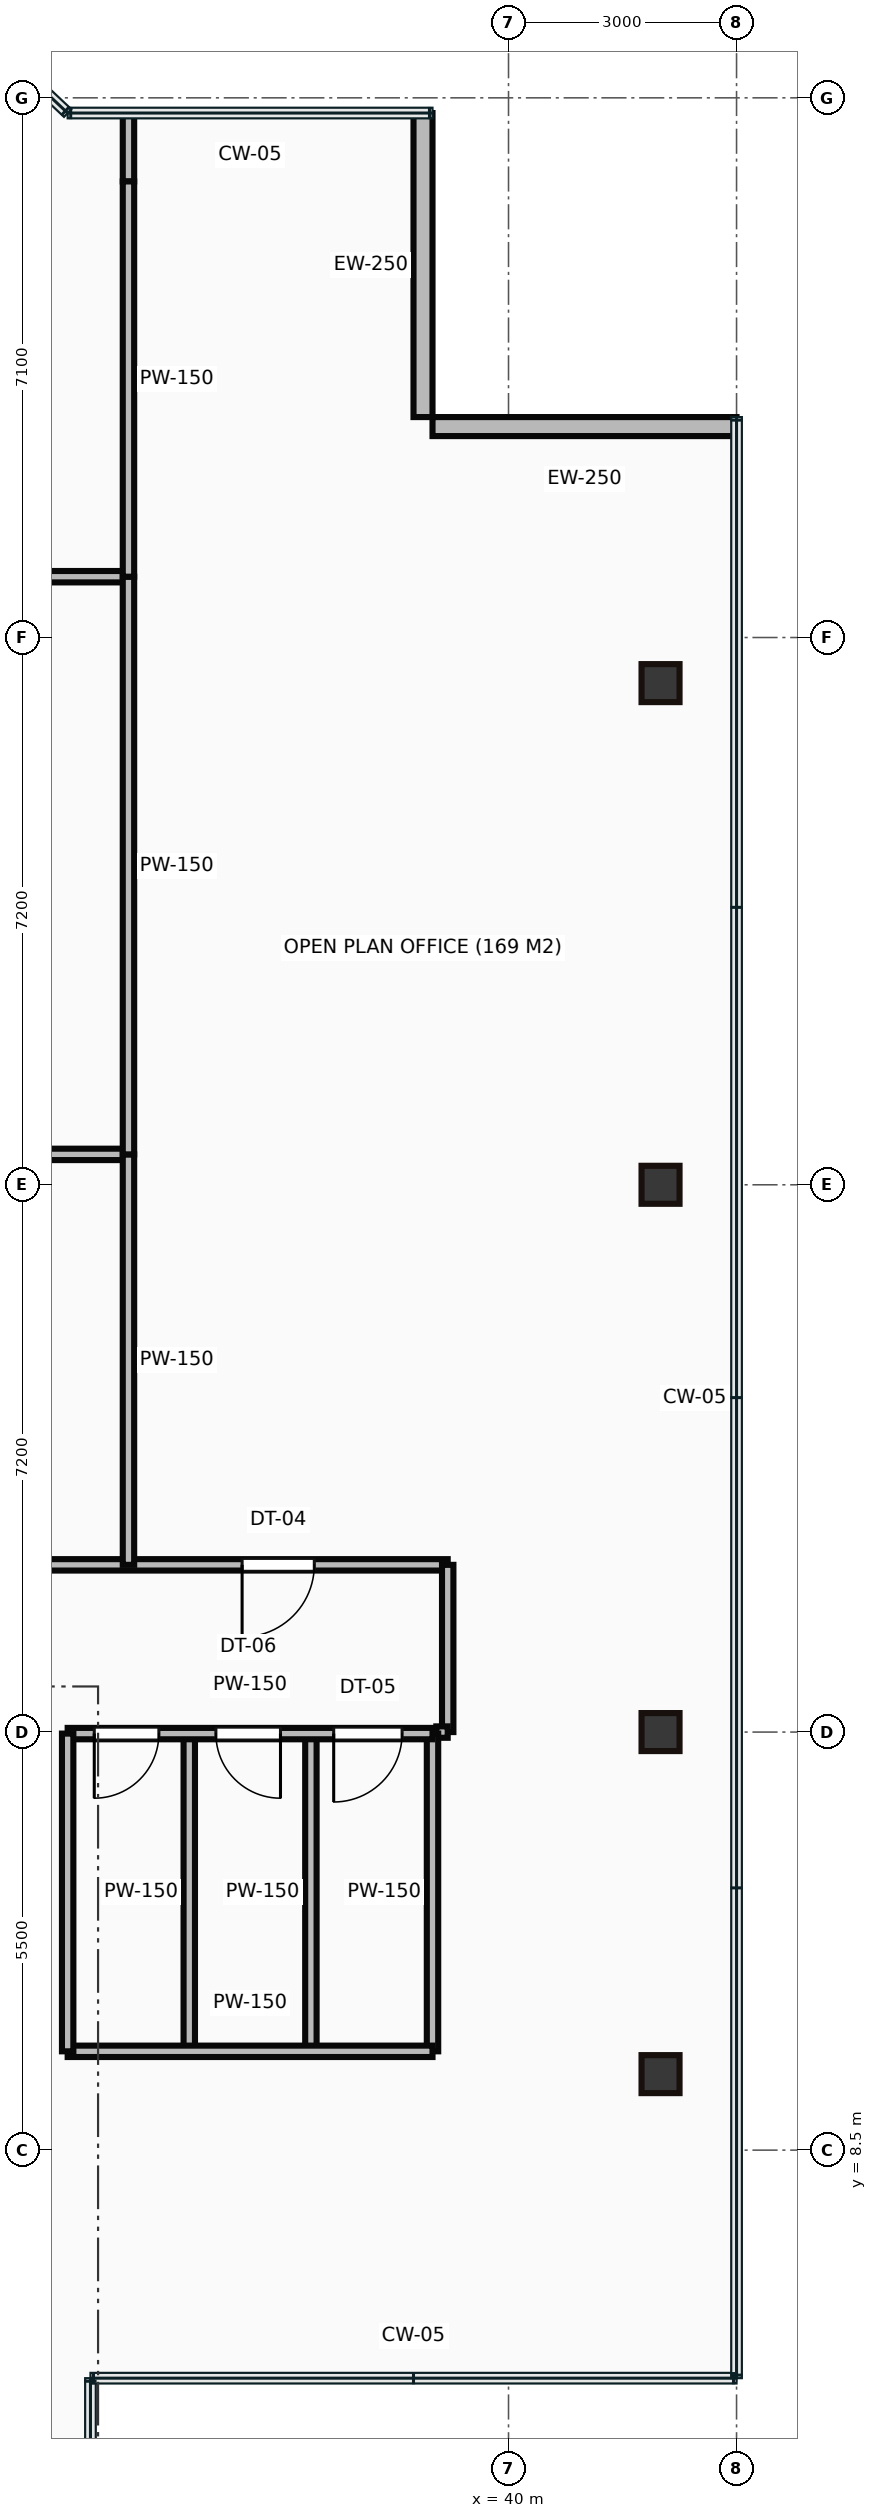
"""IFC4 building model, lengths in metres.
Left out: names, types, materials, properties, quantities, classifications, styles, units other than length and angle.
Written with IfcOpenShell. Run it as: python <this file> out.ifc"""

import sys

from ifc_helpers import new_model, si_unit, direction, frame, frame_2d, origin, origin_2d, place, context, subcontext, project, spatial, rectangle, hollow_rectangle, extrude, source, transform, mapped, element, fill, save


model = new_model("IFC4")
c1 = context("Model", 3, precision=1e-05, world=origin(), true_north=direction((0.0, 1.0)))
c2 = subcontext(c1, "Body", "Model", "MODEL_VIEW")
j1 = project(units=[si_unit("LENGTHUNIT", "METRE"), si_unit("PLANEANGLEUNIT", "RADIAN")], contexts=[c1])
p1 = place(None, origin())
s1 = spatial("IfcSite", under=j1, at=p1, CompositionType="ELEMENT")
p2 = place(p1, origin())
s2 = spatial("IfcBuilding", under=s1, at=p2, CompositionType="ELEMENT")
p3 = place(p2, frame((0.0, 0.0, 255.15)))
s3 = spatial("IfcBuildingStorey", under=s2, at=p3, CompositionType="ELEMENT", Elevation=255.15)
m1 = source(origin(), c2, "Body", "SweptSolid", [
    extrude(hollow_rectangle(XDim=0.5, YDim=0.5, WallThickness=0.022, at=origin_2d()), origin(), (0.0, 0.0, 1.0), 3.65),
])
for number, where, z_axis, x_axis in (
    (1, (42.0, 9.5, 0.0), (0.0, 0.0, 1.0), (1.0, 0.0, 0.0)),
    (2, (42.0, 14.0, 0.0), (0.0, 0.0, 1.0), (1.0, 0.0, 0.0)),
    (3, (42.0, 21.2, 0.0), (0.0, 0.0, 1.0), (1.0, 0.0, 0.0)),
    (4, (42.0, 27.8, 0.0), (0.0, 0.0, 1.0), (1.0, 0.0, 0.0)),
):
    element("IfcColumn", number, at=place(p3, frame(where, z_axis=z_axis, x_axis=x_axis)), inside=s3, PredefinedType="COLUMN", context=c2, shape_type="MappedRepresentation", body=[
        mapped(m1, transform((0.0, 0.0, 0.0))),
    ])
m2 = source(origin(), c2, "Body", "SweptSolid", [
    extrude(rectangle(XDim=4.0, YDim=0.25, at=frame_2d((2.0, 0.0))), origin(), (0.0, 0.0, 1.0), 3.4),
])
for number, where, z_axis, x_axis in (
    (5, (43.0, 31.175, 0.0), (0.0, 0.0, 1.0), (-1.0, 0.0, 0.0)),
    (6, (38.875, 31.3, 0.0), (0.0, 0.0, 1.0), (0.0, 1.0, 0.0)),
):
    element("IfcWall", number, at=place(p3, frame(where, z_axis=z_axis, x_axis=x_axis)), inside=s3, PredefinedType="STANDARD", context=c2, shape_type="MappedRepresentation", body=[
        mapped(m2, transform((0.0, 0.0, 0.0))),
    ])
m3 = source(origin(), c2, "Body", "SweptSolid", [
    extrude(rectangle(XDim=4.8, YDim=0.15, at=frame_2d((2.4, 0.0))), origin(), (0.0, 0.0, 1.0), 2.787),
])
p4 = place(p3, frame((34.2, 13.98, 0.0), z_axis=(0.0, 0.0, 1.0), x_axis=(1.0, 0.0, 0.0)))
e7 = element("IfcWall", 7, at=p4, inside=s3, PredefinedType="PARTITIONING", context=c2, shape_type="MappedRepresentation", body=[
    mapped(m3, transform((0.0, 0.0, 0.0))),
])
p5 = place(p4, frame((0.35, 0.0, 0.0)))
e8 = element("IfcOpeningElement", 8, at=p5, cuts=e7, PredefinedType="OPENING", context=c2, shape_type="SweptSolid", body=[
    extrude(rectangle(XDim=0.85, YDim=2.1, at=frame_2d((0.425, 1.05))), frame((0.0, 0.085, 0.0), z_axis=(0.0, -1.0, 0.0), x_axis=(1.0, 0.0, 0.0)), (0.0, 0.0, 1.0), 0.17),
])
p6 = place(p4, frame((1.95, 0.0, 0.0)))
e9 = element("IfcOpeningElement", 9, at=p6, cuts=e7, PredefinedType="OPENING", context=c2, shape_type="SweptSolid", body=[
    extrude(rectangle(XDim=0.85, YDim=2.1, at=frame_2d((0.425, 1.05))), frame((0.0, 0.085, 0.0), z_axis=(0.0, -1.0, 0.0), x_axis=(1.0, 0.0, 0.0)), (0.0, 0.0, 1.0), 0.17),
])
p7 = place(p4, frame((3.5, 0.0, 0.0)))
e10 = element("IfcOpeningElement", 10, at=p7, cuts=e7, PredefinedType="OPENING", context=c2, shape_type="SweptSolid", body=[
    extrude(rectangle(XDim=0.9, YDim=2.1, at=frame_2d((0.45, 1.05))), frame((0.0, 0.085, 0.0), z_axis=(0.0, -1.0, 0.0), x_axis=(1.0, 0.0, 0.0)), (0.0, 0.0, 1.0), 0.17),
])
m4 = source(origin(), c2, "Body", "SweptSolid", [
    extrude(rectangle(XDim=4.8, YDim=0.15, at=frame_2d((2.4, 0.0))), origin(), (0.0, 0.0, 1.0), 3.4),
])
p8 = place(p3, frame((34.2, 9.8, 0.0), z_axis=(0.0, 0.0, 1.0), x_axis=(1.0, 0.0, 0.0)))
e11 = element("IfcWall", 11, at=p8, inside=s3, PredefinedType="PARTITIONING", context=c2, shape_type="MappedRepresentation", body=[
    mapped(m4, transform((0.0, 0.0, 0.0))),
])
m5 = source(origin(), c2, "Body", "SweptSolid", [
    extrude(rectangle(XDim=4.18, YDim=0.15, at=frame_2d((2.09, 0.0))), origin(), (0.0, 0.0, 1.0), 3.4),
])
for number, where, z_axis, x_axis in (
    (12, (39.0, 9.8, 0.0), (0.0, 0.0, 1.0), (0.0, 1.0, 0.0)),
    (13, (34.2, 9.8, 0.0), (0.0, 0.0, 1.0), (0.0, 1.0, 0.0)),
    (14, (35.8, 9.8, 0.0), (0.0, 0.0, 1.0), (0.0, 1.0, 0.0)),
    (15, (37.4, 9.8, 0.0), (0.0, 0.0, 1.0), (0.0, 1.0, 0.0)),
):
    element("IfcWall", number, at=place(p3, frame(where, z_axis=z_axis, x_axis=x_axis)), inside=s3, PredefinedType="PARTITIONING", context=c2, shape_type="MappedRepresentation", body=[
        mapped(m5, transform((0.0, 0.0, 0.0))),
    ])
m6 = source(origin(), c2, "Body", "SweptSolid", [
    extrude(rectangle(XDim=13.45, YDim=0.15, at=frame_2d((6.725, 0.0))), origin(), (0.0, 0.0, 1.0), 3.4),
])
p9 = place(p3, frame((25.75, 16.2, 0.0), z_axis=(0.0, 0.0, 1.0), x_axis=(1.0, 0.0, 0.0)))
e16 = element("IfcWall", 16, at=p9, inside=s3, PredefinedType="PARTITIONING", context=c2, shape_type="MappedRepresentation", body=[
    mapped(m6, transform((0.0, 0.0, 0.0))),
])
p10 = place(p9, frame((4.28, 0.0, 0.0)))
e17 = element("IfcOpeningElement", 17, at=p10, cuts=e16, PredefinedType="OPENING", context=c2, shape_type="SweptSolid", body=[
    extrude(rectangle(XDim=0.95, YDim=2.15, at=frame_2d((0.475, 1.075))), frame((0.0, 0.085, 0.0), z_axis=(0.0, -1.0, 0.0), x_axis=(1.0, 0.0, 0.0)), (0.0, 0.0, 1.0), 0.17),
])
p11 = place(p9, frame((10.745, 0.0, 0.0)))
e18 = element("IfcOpeningElement", 18, at=p11, cuts=e16, PredefinedType="OPENING", context=c2, shape_type="SweptSolid", body=[
    extrude(rectangle(XDim=0.95, YDim=2.15, at=frame_2d((0.475, 1.075))), frame((0.0, 0.085, 0.0), z_axis=(0.0, -1.0, 0.0), x_axis=(1.0, 0.0, 0.0)), (0.0, 0.0, 1.0), 0.17),
])
m7 = source(origin(), c2, "Body", "SweptSolid", [
    extrude(rectangle(XDim=2.2, YDim=0.15, at=frame_2d((1.1, 0.0))), origin(), (0.0, 0.0, 1.0), 3.4),
])
p12 = place(p3, frame((39.2, 16.2, 0.0), z_axis=(0.0, 0.0, 1.0), x_axis=(0.0, -1.0, 0.0)))
e19 = element("IfcWall", 19, at=p12, inside=s3, PredefinedType="PARTITIONING", context=c2, shape_type="MappedRepresentation", body=[
    mapped(m7, transform((0.0, 0.0, 0.0))),
])
m8 = source(origin(), c2, "Body", "SweptSolid", [
    extrude(rectangle(XDim=0.15, YDim=0.15, at=frame_2d((0.075, 0.0))), origin(), (0.0, 0.0, 1.0), 3.4),
])
p13 = place(p3, frame((39.2, 14.0, 0.0), z_axis=(0.0, 0.0, 1.0), x_axis=(-1.0, 0.0, 0.0)))
e20 = element("IfcWall", 20, at=p13, inside=s3, PredefinedType="PARTITIONING", context=c2, shape_type="MappedRepresentation", body=[
    mapped(m8, transform((0.0, 0.0, 0.0))),
])
m9 = source(origin(), c2, "Body", "SweptSolid", [
    extrude(rectangle(XDim=9.25, YDim=0.15, at=frame_2d((4.625, 0.0))), origin(), (0.0, 0.0, 1.0), 3.4),
])
for number, where, z_axis, x_axis in (
    (21, (25.75, 21.6, 0.0), (0.0, 0.0, 1.0), (1.0, 0.0, 0.0)),
    (22, (35.0, 29.2, 0.0), (0.0, 0.0, 1.0), (-1.0, 0.0, 0.0)),
):
    element("IfcWall", number, at=place(p3, frame(where, z_axis=z_axis, x_axis=x_axis)), inside=s3, PredefinedType="PARTITIONING", context=c2, shape_type="MappedRepresentation", body=[
        mapped(m9, transform((0.0, 0.0, 0.0))),
    ])
m10 = source(origin(), c2, "Body", "SweptSolid", [
    extrude(rectangle(XDim=5.4, YDim=0.15, at=frame_2d((2.7, 0.0))), origin(), (0.0, 0.0, 1.0), 3.4),
])
p14 = place(p3, frame((35.0, 21.6, 0.0), z_axis=(0.0, 0.0, 1.0), x_axis=(0.0, -1.0, 0.0)))
e23 = element("IfcWall", 23, at=p14, inside=s3, PredefinedType="PARTITIONING", context=c2, shape_type="MappedRepresentation", body=[
    mapped(m10, transform((0.0, 0.0, 0.0))),
])
m11 = source(origin(), c2, "Body", "SweptSolid", [
    extrude(rectangle(XDim=7.6, YDim=0.15, at=frame_2d((3.8, 0.0))), origin(), (0.0, 0.0, 1.0), 3.4),
])
p15 = place(p3, frame((35.0, 29.2, 0.0), z_axis=(0.0, 0.0, 1.0), x_axis=(0.0, -1.0, 0.0)))
e24 = element("IfcWall", 24, at=p15, inside=s3, PredefinedType="PARTITIONING", context=c2, shape_type="MappedRepresentation", body=[
    mapped(m11, transform((0.0, 0.0, 0.0))),
])
m12 = source(origin(), c2, "Body", "SweptSolid", [
    extrude(rectangle(XDim=0.88, YDim=0.15, at=frame_2d((0.44, 0.0))), origin(), (0.0, 0.0, 1.0), 3.4),
])
p16 = place(p3, frame((35.0, 35.28, 0.0), z_axis=(0.0, 0.0, 1.0), x_axis=(0.0, -1.0, 0.0)))
e25 = element("IfcWall", 25, at=p16, inside=s3, PredefinedType="PARTITIONING", context=c2, shape_type="MappedRepresentation", body=[
    mapped(m12, transform((0.0, 0.0, 0.0))),
])
m13 = source(origin(), c2, "Body", "SweptSolid", [
    extrude(rectangle(XDim=5.2, YDim=0.15, at=frame_2d((2.6, 0.0))), origin(), (0.0, 0.0, 1.0), 3.4),
])
p17 = place(p3, frame((35.0, 34.4, 0.0), z_axis=(0.0, 0.0, 1.0), x_axis=(0.0, -1.0, 0.0)))
e26 = element("IfcWall", 26, at=p17, inside=s3, PredefinedType="PARTITIONING", context=c2, shape_type="MappedRepresentation", body=[
    mapped(m13, transform((0.0, 0.0, 0.0))),
])
m14 = source(origin(), c2, "Body", "SweptSolid", [
    extrude(rectangle(XDim=0.85, YDim=2.1, at=frame_2d((0.425, 1.05))), frame((0.0, 0.025, 0.0), z_axis=(0.0, -1.0, 0.0), x_axis=(1.0, 0.0, 0.0)), (0.0, 0.0, 1.0), 0.05),
])
p18 = place(p5, frame((0.85, 0.0, 0.0), z_axis=(0.0, 0.0, 1.0), x_axis=(-1.0, 0.0, 0.0)))
e27 = element("IfcDoor", 27, at=p18, inside=s3, OperationType="SINGLE_SWING_LEFT", PredefinedType="DOOR", context=c2, shape_type="MappedRepresentation", body=[
    mapped(m14, transform((0.0, 0.0, 0.0))),
])
fill(e8, e27)
p19 = place(p6, frame((0.85, 0.0, 0.0), z_axis=(0.0, 0.0, 1.0), x_axis=(-1.0, 0.0, 0.0)))
e28 = element("IfcDoor", 28, at=p19, inside=s3, OperationType="SINGLE_SWING_RIGHT", PredefinedType="DOOR", context=c2, shape_type="MappedRepresentation", body=[
    mapped(m14, transform((0.0, 0.0, 0.0))),
])
fill(e9, e28)
m15 = source(origin(), c2, "Body", "SweptSolid", [
    extrude(rectangle(XDim=0.9, YDim=2.1, at=frame_2d((0.45, 1.05))), frame((0.0, 0.025, 0.0), z_axis=(0.0, -1.0, 0.0), x_axis=(1.0, 0.0, 0.0)), (0.0, 0.0, 1.0), 0.05),
])
p20 = place(p7, frame((0.9, 0.0, 0.0), z_axis=(0.0, 0.0, 1.0), x_axis=(-1.0, 0.0, 0.0)))
e29 = element("IfcDoor", 29, at=p20, inside=s3, OperationType="SINGLE_SWING_LEFT", PredefinedType="DOOR", context=c2, shape_type="MappedRepresentation", body=[
    mapped(m15, transform((0.0, 0.0, 0.0))),
])
fill(e10, e29)
m16 = source(origin(), c2, "Body", "SweptSolid", [
    extrude(rectangle(XDim=0.95, YDim=2.15, at=frame_2d((0.475, 1.075))), frame((0.0, 0.025, 0.0), z_axis=(0.0, -1.0, 0.0), x_axis=(1.0, 0.0, 0.0)), (0.0, 0.0, 1.0), 0.05),
])
p21 = place(p11, origin())
e30 = element("IfcDoor", 30, at=p21, inside=s3, OperationType="SINGLE_SWING_LEFT", PredefinedType="DOOR", context=c2, shape_type="MappedRepresentation", body=[
    mapped(m16, transform((0.0, 0.0, 0.0))),
])
fill(e18, e30)
save(model, sys.argv[1])
